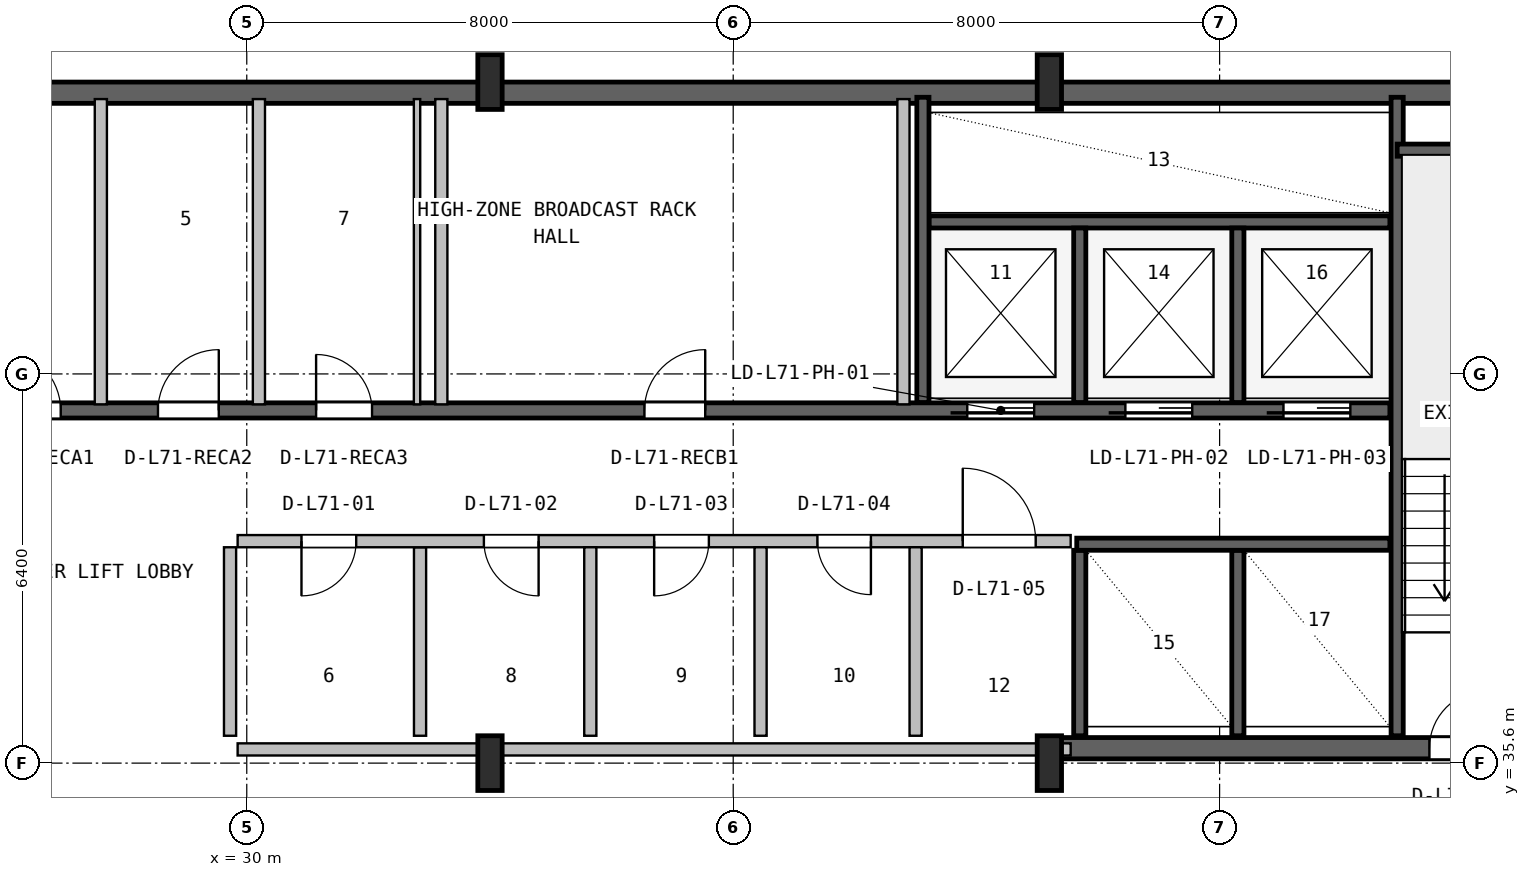
"""IFC4 building model, lengths in metres.
Left out: names, types, materials, properties, quantities, classifications, styles, units other than length and angle.
Written with IfcOpenShell. Run it as: python <this file> out.ifc"""

import sys

from ifc_helpers import new_model, si_unit, direction, frame, frame_2d, origin, origin_2d, place, context, subcontext, project, spatial, rectangle, i_section, extrude, source, transform, mapped, element, fill, save


model = new_model("IFC4")
c1 = context("Model", 3, precision=1e-05, world=origin(), true_north=direction((0.0, 1.0)))
c2 = subcontext(c1, "Body", "Model", "MODEL_VIEW")
j1 = project(units=[si_unit("LENGTHUNIT", "METRE"), si_unit("PLANEANGLEUNIT", "RADIAN")], contexts=[c1])
p1 = place(None, origin())
s1 = spatial("IfcSite", under=j1, at=p1, CompositionType="ELEMENT")
p2 = place(p1, origin())
s2 = spatial("IfcBuilding", under=s1, at=p2, CompositionType="ELEMENT")
p3 = place(p2, frame((0.0, 0.0, 285.0)))
s3 = spatial("IfcBuildingStorey", under=s2, at=p3, CompositionType="ELEMENT", Elevation=285.0)
p4 = place(p3, frame((15.325, 46.625, 0.0), z_axis=(0.0, 0.0, 1.0), x_axis=(1.0, 0.0, 0.0)))
e1 = element("IfcWall", 1, at=p4, inside=s3, PredefinedType="SHEAR", context=c2, shape_type="SweptSolid", body=[
    extrude(rectangle(XDim=37.35, YDim=0.35, at=frame_2d((18.675, 0.0))), origin(), (0.0, 0.0, 1.0), 3.55),
])
p5 = place(p3, frame((43.2, 35.845, 0.0), z_axis=(0.0, 0.0, 1.0), x_axis=(1.0, 0.0, 0.0)))
e2 = element("IfcWall", 2, at=p5, inside=s3, PredefinedType="SHEAR", context=c2, shape_type="SweptSolid", body=[
    extrude(rectangle(XDim=9.13, YDim=0.35, at=frame_2d((4.565, 0.0))), origin(), (0.0, 0.0, 1.0), 3.55),
])
p6 = place(p5, frame((6.25, 0.0, 0.0)))
e3 = element("IfcOpeningElement", 3, at=p6, cuts=e2, PredefinedType="OPENING", context=c2, shape_type="SweptSolid", body=[
    extrude(rectangle(XDim=0.95, YDim=2.1, at=frame_2d((0.475, 1.05))), frame((0.0, 0.185, 0.0), z_axis=(0.0, -1.0, 0.0), x_axis=(1.0, 0.0, 0.0)), (0.0, 0.0, 1.0), 0.37),
])
m1 = source(origin(), c2, "Body", "SweptSolid", [
    extrude(i_section(OverallWidth=0.4, OverallDepth=0.9, WebThickness=0.016, FlangeThickness=0.028, FilletRadius=0.016, at=origin_2d()), origin(), (0.0, 0.0, 1.0), 3.8),
])
for number, where, z_axis, x_axis in (
    (4, (34.0, 35.6, 0.0), (0.0, 0.0, 1.0), (1.0, 0.0, 0.0)),
    (5, (34.0, 46.8, 0.0), (0.0, 0.0, 1.0), (1.0, 0.0, 0.0)),
    (6, (43.2, 35.6, 0.0), (0.0, 0.0, 1.0), (1.0, 0.0, 0.0)),
    (7, (43.2, 46.8, 0.0), (0.0, 0.0, 1.0), (1.0, 0.0, 0.0)),
):
    element("IfcColumn", number, at=place(p3, frame(where, z_axis=z_axis, x_axis=x_axis)), inside=s3, PredefinedType="COLUMN", context=c2, shape_type="MappedRepresentation", body=[
        mapped(m1, transform((0.0, 0.0, 0.0), x_axis=(1.0, 0.0, 0.0), y_axis=(0.0, 1.0, 0.0), z_axis=(0.0, 0.0, 1.0), scale=1.0)),
    ])
p7 = place(p3, frame((48.92, 36.05, 0.0), z_axis=(0.0, 0.0, 1.0), x_axis=(0.0, 1.0, 0.0)))
e8 = element("IfcWall", 8, at=p7, inside=s3, PredefinedType="SHEAR", context=c2, shape_type="SweptSolid", body=[
    extrude(rectangle(XDim=10.5, YDim=0.2, at=frame_2d((5.25, 0.0))), origin(), (0.0, 0.0, 1.0), 3.55),
])
p8 = place(p3, frame((48.92, 45.68, 0.0), z_axis=(0.0, 0.0, 1.0), x_axis=(1.0, 0.0, 0.0)))
e9 = element("IfcWall", 9, at=p8, inside=s3, PredefinedType="SHEAR", context=c2, shape_type="SweptSolid", body=[
    extrude(rectangle(XDim=3.18, YDim=0.2, at=frame_2d((1.59, 0.0))), origin(), (0.0, 0.0, 1.0), 3.55),
])
p9 = place(p3, frame((24.98, 41.4, 0.0), z_axis=(0.0, 0.0, 1.0), x_axis=(1.0, 0.0, 0.0)))
e10 = element("IfcWall", 10, at=p9, inside=s3, PredefinedType="SHEAR", context=c2, shape_type="SweptSolid", body=[
    extrude(rectangle(XDim=23.82, YDim=0.25, at=frame_2d((11.91, 0.0))), origin(), (0.0, 0.0, 1.0), 3.55),
])
p10 = place(p9, frame((16.87, 0.0, 0.0)))
e11 = element("IfcOpeningElement", 11, at=p10, cuts=e10, PredefinedType="OPENING", context=c2, shape_type="SweptSolid", body=[
    extrude(rectangle(XDim=1.1, YDim=2.18, at=frame_2d((0.55, 1.09))), frame((0.0, 0.135, 0.0), z_axis=(0.0, -1.0, 0.0), x_axis=(1.0, 0.0, 0.0)), (0.0, 0.0, 1.0), 0.27),
])
p11 = place(p9, frame((19.47, 0.0, 0.0)))
e12 = element("IfcOpeningElement", 12, at=p11, cuts=e10, PredefinedType="OPENING", context=c2, shape_type="SweptSolid", body=[
    extrude(rectangle(XDim=1.1, YDim=2.18, at=frame_2d((0.55, 1.09))), frame((0.0, 0.135, 0.0), z_axis=(0.0, -1.0, 0.0), x_axis=(1.0, 0.0, 0.0)), (0.0, 0.0, 1.0), 0.27),
])
p12 = place(p9, frame((22.07, 0.0, 0.0)))
e13 = element("IfcOpeningElement", 13, at=p12, cuts=e10, PredefinedType="OPENING", context=c2, shape_type="SweptSolid", body=[
    extrude(rectangle(XDim=1.1, YDim=2.18, at=frame_2d((0.55, 1.09))), frame((0.0, 0.135, 0.0), z_axis=(0.0, -1.0, 0.0), x_axis=(1.0, 0.0, 0.0)), (0.0, 0.0, 1.0), 0.27),
])
p13 = place(p9, frame((0.96, 0.0, 0.0)))
e14 = element("IfcOpeningElement", 14, at=p13, cuts=e10, PredefinedType="OPENING", context=c2, shape_type="SweptSolid", body=[
    extrude(rectangle(XDim=1.0, YDim=2.08, at=frame_2d((0.5, 1.04))), frame((0.0, 0.135, 0.0), z_axis=(0.0, -1.0, 0.0), x_axis=(1.0, 0.0, 0.0)), (0.0, 0.0, 1.0), 0.27),
])
p14 = place(p9, frame((3.56, 0.0, 0.0)))
e15 = element("IfcOpeningElement", 15, at=p14, cuts=e10, PredefinedType="OPENING", context=c2, shape_type="SweptSolid", body=[
    extrude(rectangle(XDim=1.0, YDim=2.08, at=frame_2d((0.5, 1.04))), frame((0.0, 0.135, 0.0), z_axis=(0.0, -1.0, 0.0), x_axis=(1.0, 0.0, 0.0)), (0.0, 0.0, 1.0), 0.27),
])
p15 = place(p9, frame((6.16, 0.0, 0.0)))
e16 = element("IfcOpeningElement", 16, at=p15, cuts=e10, PredefinedType="OPENING", context=c2, shape_type="SweptSolid", body=[
    extrude(rectangle(XDim=0.92, YDim=2.08, at=frame_2d((0.46, 1.04))), frame((0.0, 0.135, 0.0), z_axis=(0.0, -1.0, 0.0), x_axis=(1.0, 0.0, 0.0)), (0.0, 0.0, 1.0), 0.27),
])
p16 = place(p9, frame((11.56, 0.0, 0.0)))
e17 = element("IfcOpeningElement", 17, at=p16, cuts=e10, PredefinedType="OPENING", context=c2, shape_type="SweptSolid", body=[
    extrude(rectangle(XDim=1.0, YDim=2.08, at=frame_2d((0.5, 1.04))), frame((0.0, 0.135, 0.0), z_axis=(0.0, -1.0, 0.0), x_axis=(1.0, 0.0, 0.0)), (0.0, 0.0, 1.0), 0.27),
])
p17 = place(p3, frame((41.22, 44.5, 0.0), z_axis=(0.0, 0.0, 1.0), x_axis=(1.0, 0.0, 0.0)))
e18 = element("IfcWall", 18, at=p17, inside=s3, PredefinedType="SHEAR", context=c2, shape_type="SweptSolid", body=[
    extrude(rectangle(XDim=7.58, YDim=0.2, at=frame_2d((3.79, 0.0))), origin(), (0.0, 0.0, 1.0), 3.55),
])
p18 = place(p3, frame((41.12, 41.53, 0.0), z_axis=(0.0, 0.0, 1.0), x_axis=(0.0, 1.0, 0.0)))
e19 = element("IfcWall", 19, at=p18, inside=s3, PredefinedType="SHEAR", context=c2, shape_type="SweptSolid", body=[
    extrude(rectangle(XDim=5.02, YDim=0.2, at=frame_2d((2.51, 0.0))), origin(), (0.0, 0.0, 1.0), 3.55),
])
for number, where, z_axis, x_axis in (
    (20, (43.7, 41.53, 0.0), (0.0, 0.0, 1.0), (0.0, 1.0, 0.0)),
    (21, (46.3, 41.53, 0.0), (0.0, 0.0, 1.0), (0.0, 1.0, 0.0)),
):
    element("IfcWall", number, at=place(p3, frame(where, z_axis=z_axis, x_axis=x_axis)), inside=s3, PredefinedType="SHEAR", context=c2, shape_type="SweptSolid", body=[
        extrude(rectangle(XDim=2.87, YDim=0.2, at=frame_2d((1.435, 0.0))), origin(), (0.0, 0.0, 1.0), 3.55),
    ])
for number, where, z_axis, x_axis in (
    (22, (43.7, 36.05, 0.0), (0.0, 0.0, 1.0), (0.0, 1.0, 0.0)),
    (23, (46.3, 36.05, 0.0), (0.0, 0.0, 1.0), (0.0, 1.0, 0.0)),
):
    element("IfcWall", number, at=place(p3, frame(where, z_axis=z_axis, x_axis=x_axis)), inside=s3, PredefinedType="SHEAR", context=c2, shape_type="SweptSolid", body=[
        extrude(rectangle(XDim=3.05, YDim=0.2, at=frame_2d((1.525, 0.0))), origin(), (0.0, 0.0, 1.0), 3.55),
    ])
p19 = place(p3, frame((43.65, 39.2, 0.0), z_axis=(0.0, 0.0, 1.0), x_axis=(1.0, 0.0, 0.0)))
e24 = element("IfcWall", 24, at=p19, inside=s3, PredefinedType="SHEAR", context=c2, shape_type="SweptSolid", body=[
    extrude(rectangle(XDim=5.15, YDim=0.2, at=frame_2d((2.575, 0.0))), origin(), (0.0, 0.0, 1.0), 3.55),
])
p20 = place(p3, frame((29.85, 35.825, 0.0), z_axis=(0.0, 0.0, 1.0), x_axis=(1.0, 0.0, 0.0)))
e25 = element("IfcWall", 25, at=p20, inside=s3, PredefinedType="SOLIDWALL", context=c2, shape_type="SweptSolid", body=[
    extrude(rectangle(XDim=13.7, YDim=0.2, at=frame_2d((6.85, 0.0))), origin(), (0.0, 0.0, 1.0), 2.575),
])
p21 = place(p3, frame((32.85, 36.05, 0.0), z_axis=(0.0, 0.0, 1.0), x_axis=(0.0, 1.0, 0.0)))
e26 = element("IfcWall", 26, at=p21, inside=s3, PredefinedType="PLUMBINGWALL", context=c2, shape_type="SweptSolid", body=[
    extrude(rectangle(XDim=3.1, YDim=0.2, at=frame_2d((1.55, 0.0))), origin(), (0.0, 0.0, 1.0), 3.53),
])
p22 = place(p3, frame((29.85, 39.25, 0.0), z_axis=(0.0, 0.0, 1.0), x_axis=(1.0, 0.0, 0.0)))
e27 = element("IfcWall", 27, at=p22, inside=s3, PredefinedType="SOLIDWALL", context=c2, shape_type="SweptSolid", body=[
    extrude(rectangle(XDim=13.7, YDim=0.2, at=frame_2d((6.85, 0.0))), origin(), (0.0, 0.0, 1.0), 3.53),
])
p23 = place(p22, frame((1.05, 0.0, 0.0)))
e28 = element("IfcOpeningElement", 28, at=p23, cuts=e27, PredefinedType="OPENING", context=c2, shape_type="SweptSolid", body=[
    extrude(rectangle(XDim=0.9, YDim=2.06, at=frame_2d((0.45, 1.03))), frame((0.0, 0.11, 0.0), z_axis=(0.0, -1.0, 0.0), x_axis=(1.0, 0.0, 0.0)), (0.0, 0.0, 1.0), 0.22),
])
p24 = place(p22, frame((4.05, 0.0, 0.0)))
e29 = element("IfcOpeningElement", 29, at=p24, cuts=e27, PredefinedType="OPENING", context=c2, shape_type="SweptSolid", body=[
    extrude(rectangle(XDim=0.9, YDim=2.06, at=frame_2d((0.45, 1.03))), frame((0.0, 0.11, 0.0), z_axis=(0.0, -1.0, 0.0), x_axis=(1.0, 0.0, 0.0)), (0.0, 0.0, 1.0), 0.22),
])
p25 = place(p22, frame((6.85, 0.0, 0.0)))
e30 = element("IfcOpeningElement", 30, at=p25, cuts=e27, PredefinedType="OPENING", context=c2, shape_type="SweptSolid", body=[
    extrude(rectangle(XDim=0.9, YDim=2.06, at=frame_2d((0.45, 1.03))), frame((0.0, 0.11, 0.0), z_axis=(0.0, -1.0, 0.0), x_axis=(1.0, 0.0, 0.0)), (0.0, 0.0, 1.0), 0.22),
])
p26 = place(p22, frame((9.535, 0.0, 0.0)))
e31 = element("IfcOpeningElement", 31, at=p26, cuts=e27, PredefinedType="OPENING", context=c2, shape_type="SweptSolid", body=[
    extrude(rectangle(XDim=0.88, YDim=2.06, at=frame_2d((0.44, 1.03))), frame((0.0, 0.11, 0.0), z_axis=(0.0, -1.0, 0.0), x_axis=(1.0, 0.0, 0.0)), (0.0, 0.0, 1.0), 0.22),
])
p27 = place(p22, frame((11.925, 0.0, 0.0)))
e32 = element("IfcOpeningElement", 32, at=p27, cuts=e27, PredefinedType="OPENING", context=c2, shape_type="SweptSolid", body=[
    extrude(rectangle(XDim=1.2, YDim=2.1, at=frame_2d((0.6, 1.05))), frame((0.0, 0.11, 0.0), z_axis=(0.0, -1.0, 0.0), x_axis=(1.0, 0.0, 0.0)), (0.0, 0.0, 1.0), 0.22),
])
for number, where, z_axis, x_axis in (
    (33, (29.725, 36.05, 0.0), (0.0, 0.0, 1.0), (0.0, 1.0, 0.0)),
    (34, (35.65, 36.05, 0.0), (0.0, 0.0, 1.0), (0.0, 1.0, 0.0)),
    (35, (38.45, 36.05, 0.0), (0.0, 0.0, 1.0), (0.0, 1.0, 0.0)),
):
    element("IfcWall", number, at=place(p3, frame(where, z_axis=z_axis, x_axis=x_axis)), inside=s3, PredefinedType="PLUMBINGWALL", context=c2, shape_type="SweptSolid", body=[
        extrude(rectangle(XDim=3.1, YDim=0.2, at=frame_2d((1.55, 0.0))), origin(), (0.0, 0.0, 1.0), 3.53),
    ])
p28 = place(p3, frame((41.0, 36.05, 0.0), z_axis=(0.0, 0.0, 1.0), x_axis=(0.0, 1.0, 0.0)))
e36 = element("IfcWall", 36, at=p28, inside=s3, PredefinedType="SOLIDWALL", context=c2, shape_type="SweptSolid", body=[
    extrude(rectangle(XDim=3.1, YDim=0.2, at=frame_2d((1.55, 0.0))), origin(), (0.0, 0.0, 1.0), 3.53),
])
for number, where, z_axis, x_axis in (
    (37, (27.6, 41.5, 0.0), (0.0, 0.0, 1.0), (0.0, 1.0, 0.0)),
    (38, (30.2, 41.5, 0.0), (0.0, 0.0, 1.0), (0.0, 1.0, 0.0)),
):
    element("IfcWall", number, at=place(p3, frame(where, z_axis=z_axis, x_axis=x_axis)), inside=s3, PredefinedType="SOLIDWALL", context=c2, shape_type="SweptSolid", body=[
        extrude(rectangle(XDim=5.02, YDim=0.2, at=frame_2d((2.51, 0.0))), origin(), (0.0, 0.0, 1.0), 3.53),
    ])
p29 = place(p3, frame((32.8, 41.5, 0.0), z_axis=(0.0, 0.0, 1.0), x_axis=(0.0, 1.0, 0.0)))
e39 = element("IfcWall", 39, at=p29, inside=s3, PredefinedType="PARTITIONING", context=c2, shape_type="SweptSolid", body=[
    extrude(rectangle(XDim=5.02, YDim=0.105, at=frame_2d((2.51, 0.0))), origin(), (0.0, 0.0, 1.0), 3.53),
])
for number, where, z_axis, x_axis in (
    (40, (40.8, 41.5, 0.0), (0.0, 0.0, 1.0), (0.0, 1.0, 0.0)),
    (41, (33.2, 41.5, 0.0), (0.0, 0.0, 1.0), (0.0, 1.0, 0.0)),
):
    element("IfcWall", number, at=place(p3, frame(where, z_axis=z_axis, x_axis=x_axis)), inside=s3, PredefinedType="SOLIDWALL", context=c2, shape_type="SweptSolid", body=[
        extrude(rectangle(XDim=5.02, YDim=0.2, at=frame_2d((2.51, 0.0))), origin(), (0.0, 0.0, 1.0), 3.53),
    ])
m2 = source(origin(), c2, "Body", "SweptSolid", [
    extrude(rectangle(XDim=0.95, YDim=2.1, at=frame_2d((0.475, 1.05))), frame((0.0, 0.025, 0.0), z_axis=(0.0, -1.0, 0.0), x_axis=(1.0, 0.0, 0.0)), (0.0, 0.0, 1.0), 0.05),
])
p30 = place(p6, origin())
e42 = element("IfcDoor", 42, at=p30, inside=s3, OperationType="SINGLE_SWING_RIGHT", PredefinedType="DOOR", context=c2, shape_type="MappedRepresentation", body=[
    mapped(m2, transform((0.0, 0.0, 0.0), x_axis=(1.0, 0.0, 0.0), y_axis=(0.0, 1.0, 0.0), z_axis=(0.0, 0.0, 1.0), scale=1.0)),
])
fill(e3, e42)
m3 = source(origin(), c2, "Body", "SweptSolid", [
    extrude(rectangle(XDim=1.1, YDim=2.18, at=frame_2d((0.55, 1.09))), frame((0.0, 0.025, 0.0), z_axis=(0.0, -1.0, 0.0), x_axis=(1.0, 0.0, 0.0)), (0.0, 0.0, 1.0), 0.05),
])
p31 = place(p10, frame((1.1, 0.0, 0.0), z_axis=(0.0, 0.0, 1.0), x_axis=(-1.0, 0.0, 0.0)))
e43 = element("IfcDoor", 43, at=p31, inside=s3, OperationType="SLIDING_TO_LEFT", PredefinedType="DOOR", context=c2, shape_type="MappedRepresentation", body=[
    mapped(m3, transform((0.0, 0.0, 0.0), x_axis=(1.0, 0.0, 0.0), y_axis=(0.0, 1.0, 0.0), z_axis=(0.0, 0.0, 1.0), scale=1.0)),
])
fill(e11, e43)
p32 = place(p11, frame((1.1, 0.0, 0.0), z_axis=(0.0, 0.0, 1.0), x_axis=(-1.0, 0.0, 0.0)))
e44 = element("IfcDoor", 44, at=p32, inside=s3, OperationType="SLIDING_TO_LEFT", PredefinedType="DOOR", context=c2, shape_type="MappedRepresentation", body=[
    mapped(m3, transform((0.0, 0.0, 0.0), x_axis=(1.0, 0.0, 0.0), y_axis=(0.0, 1.0, 0.0), z_axis=(0.0, 0.0, 1.0), scale=1.0)),
])
fill(e12, e44)
p33 = place(p12, frame((1.1, 0.0, 0.0), z_axis=(0.0, 0.0, 1.0), x_axis=(-1.0, 0.0, 0.0)))
e45 = element("IfcDoor", 45, at=p33, inside=s3, OperationType="SLIDING_TO_LEFT", PredefinedType="DOOR", context=c2, shape_type="MappedRepresentation", body=[
    mapped(m3, transform((0.0, 0.0, 0.0), x_axis=(1.0, 0.0, 0.0), y_axis=(0.0, 1.0, 0.0), z_axis=(0.0, 0.0, 1.0), scale=1.0)),
])
fill(e13, e45)
m4 = source(origin(), c2, "Body", "SweptSolid", [
    extrude(rectangle(XDim=1.0, YDim=2.08, at=frame_2d((0.5, 1.04))), frame((0.0, 0.025, 0.0), z_axis=(0.0, -1.0, 0.0), x_axis=(1.0, 0.0, 0.0)), (0.0, 0.0, 1.0), 0.05),
])
p34 = place(p13, origin())
e46 = element("IfcDoor", 46, at=p34, inside=s3, OperationType="SINGLE_SWING_LEFT", PredefinedType="DOOR", context=c2, shape_type="MappedRepresentation", body=[
    mapped(m4, transform((0.0, 0.0, 0.0), x_axis=(1.0, 0.0, 0.0), y_axis=(0.0, 1.0, 0.0), z_axis=(0.0, 0.0, 1.0), scale=1.0)),
])
fill(e14, e46)
p35 = place(p14, origin())
e47 = element("IfcDoor", 47, at=p35, inside=s3, OperationType="SINGLE_SWING_RIGHT", PredefinedType="DOOR", context=c2, shape_type="MappedRepresentation", body=[
    mapped(m4, transform((0.0, 0.0, 0.0), x_axis=(1.0, 0.0, 0.0), y_axis=(0.0, 1.0, 0.0), z_axis=(0.0, 0.0, 1.0), scale=1.0)),
])
fill(e15, e47)
m5 = source(origin(), c2, "Body", "SweptSolid", [
    extrude(rectangle(XDim=0.92, YDim=2.08, at=frame_2d((0.46, 1.04))), frame((0.0, 0.025, 0.0), z_axis=(0.0, -1.0, 0.0), x_axis=(1.0, 0.0, 0.0)), (0.0, 0.0, 1.0), 0.05),
])
p36 = place(p15, origin())
e48 = element("IfcDoor", 48, at=p36, inside=s3, OperationType="SINGLE_SWING_LEFT", PredefinedType="DOOR", context=c2, shape_type="MappedRepresentation", body=[
    mapped(m5, transform((0.0, 0.0, 0.0), x_axis=(1.0, 0.0, 0.0), y_axis=(0.0, 1.0, 0.0), z_axis=(0.0, 0.0, 1.0), scale=1.0)),
])
fill(e16, e48)
p37 = place(p16, origin())
e49 = element("IfcDoor", 49, at=p37, inside=s3, OperationType="SINGLE_SWING_RIGHT", PredefinedType="DOOR", context=c2, shape_type="MappedRepresentation", body=[
    mapped(m4, transform((0.0, 0.0, 0.0), x_axis=(1.0, 0.0, 0.0), y_axis=(0.0, 1.0, 0.0), z_axis=(0.0, 0.0, 1.0), scale=1.0)),
])
fill(e17, e49)
m6 = source(origin(), c2, "Body", "SweptSolid", [
    extrude(rectangle(XDim=0.9, YDim=2.06, at=frame_2d((0.45, 1.03))), frame((0.0, 0.025, 0.0), z_axis=(0.0, -1.0, 0.0), x_axis=(1.0, 0.0, 0.0)), (0.0, 0.0, 1.0), 0.05),
])
p38 = place(p23, frame((0.9, 0.0, 0.0), z_axis=(0.0, 0.0, 1.0), x_axis=(-1.0, 0.0, 0.0)))
e50 = element("IfcDoor", 50, at=p38, inside=s3, OperationType="SINGLE_SWING_LEFT", PredefinedType="DOOR", context=c2, shape_type="MappedRepresentation", body=[
    mapped(m6, transform((0.0, 0.0, 0.0), x_axis=(1.0, 0.0, 0.0), y_axis=(0.0, 1.0, 0.0), z_axis=(0.0, 0.0, 1.0), scale=1.0)),
])
fill(e28, e50)
p39 = place(p24, frame((0.9, 0.0, 0.0), z_axis=(0.0, 0.0, 1.0), x_axis=(-1.0, 0.0, 0.0)))
e51 = element("IfcDoor", 51, at=p39, inside=s3, OperationType="SINGLE_SWING_RIGHT", PredefinedType="DOOR", context=c2, shape_type="MappedRepresentation", body=[
    mapped(m6, transform((0.0, 0.0, 0.0), x_axis=(1.0, 0.0, 0.0), y_axis=(0.0, 1.0, 0.0), z_axis=(0.0, 0.0, 1.0), scale=1.0)),
])
fill(e29, e51)
p40 = place(p25, frame((0.9, 0.0, 0.0), z_axis=(0.0, 0.0, 1.0), x_axis=(-1.0, 0.0, 0.0)))
e52 = element("IfcDoor", 52, at=p40, inside=s3, OperationType="SINGLE_SWING_LEFT", PredefinedType="DOOR", context=c2, shape_type="MappedRepresentation", body=[
    mapped(m6, transform((0.0, 0.0, 0.0), x_axis=(1.0, 0.0, 0.0), y_axis=(0.0, 1.0, 0.0), z_axis=(0.0, 0.0, 1.0), scale=1.0)),
])
fill(e30, e52)
m7 = source(origin(), c2, "Body", "SweptSolid", [
    extrude(rectangle(XDim=0.88, YDim=2.06, at=frame_2d((0.44, 1.03))), frame((0.0, 0.025, 0.0), z_axis=(0.0, -1.0, 0.0), x_axis=(1.0, 0.0, 0.0)), (0.0, 0.0, 1.0), 0.05),
])
p41 = place(p26, frame((0.88, 0.0, 0.0), z_axis=(0.0, 0.0, 1.0), x_axis=(-1.0, 0.0, 0.0)))
e53 = element("IfcDoor", 53, at=p41, inside=s3, OperationType="SINGLE_SWING_RIGHT", PredefinedType="DOOR", context=c2, shape_type="MappedRepresentation", body=[
    mapped(m7, transform((0.0, 0.0, 0.0), x_axis=(1.0, 0.0, 0.0), y_axis=(0.0, 1.0, 0.0), z_axis=(0.0, 0.0, 1.0), scale=1.0)),
])
fill(e31, e53)
m8 = source(origin(), c2, "Body", "SweptSolid", [
    extrude(rectangle(XDim=1.2, YDim=2.1, at=frame_2d((0.6, 1.05))), frame((0.0, 0.025, 0.0), z_axis=(0.0, -1.0, 0.0), x_axis=(1.0, 0.0, 0.0)), (0.0, 0.0, 1.0), 0.05),
])
p42 = place(p27, origin())
e54 = element("IfcDoor", 54, at=p42, inside=s3, OperationType="SINGLE_SWING_LEFT", PredefinedType="DOOR", context=c2, shape_type="MappedRepresentation", body=[
    mapped(m8, transform((0.0, 0.0, 0.0), x_axis=(1.0, 0.0, 0.0), y_axis=(0.0, 1.0, 0.0), z_axis=(0.0, 0.0, 1.0), scale=1.0)),
])
fill(e32, e54)
save(model, sys.argv[1])
